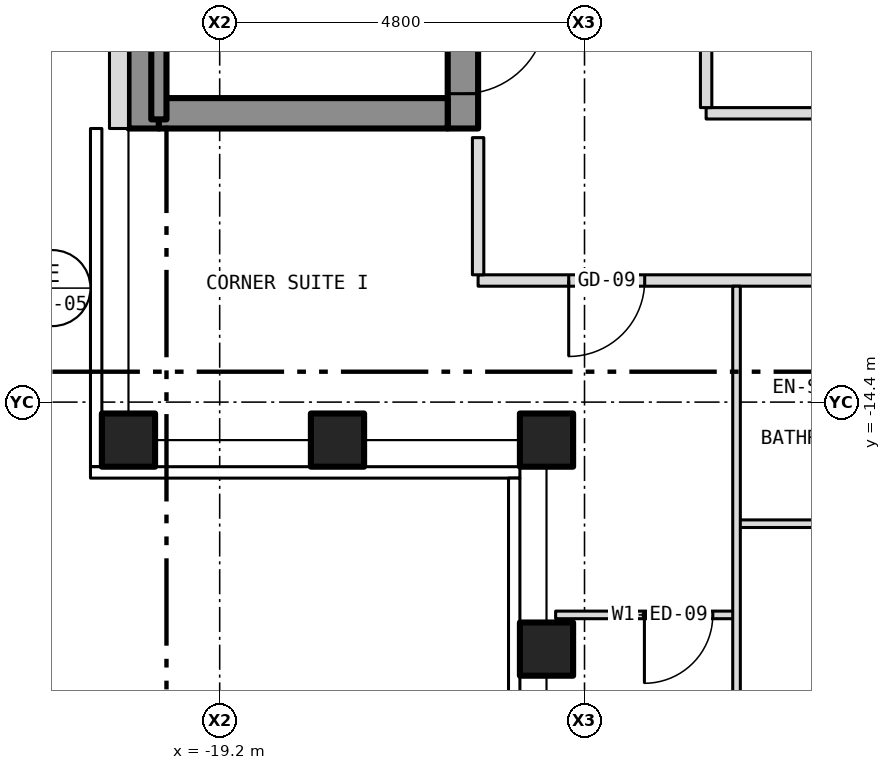
"""IFC4 building model, lengths in metres.
Left out: names, types, materials, properties, quantities, classifications, styles, units other than length and angle.
Written with IfcOpenShell. Run it as: python <this file> out.ifc"""

import sys

from ifc_helpers import new_model, si_unit, direction, frame, frame_2d, origin, origin_2d, place, context, subcontext, project, spatial, rectangle, hollow_rectangle, extrude, element, fill, save


model = new_model("IFC4")
c1 = context("Model", 3, precision=1e-05, world=origin(), true_north=direction((0.0, 1.0)))
c2 = subcontext(c1, "Body", "Model", "MODEL_VIEW")
j1 = project(units=[si_unit("LENGTHUNIT", "METRE"), si_unit("PLANEANGLEUNIT", "RADIAN")], contexts=[c1])
p1 = place(None, origin())
s1 = spatial("IfcSite", under=j1, at=p1, CompositionType="ELEMENT")
p2 = place(p1, origin())
s2 = spatial("IfcBuilding", under=s1, at=p2, CompositionType="ELEMENT")
p3 = place(p2, frame((0.0, 0.0, 201.5)))
s3 = spatial("IfcBuildingStorey", under=s2, at=p3, CompositionType="ELEMENT", Elevation=201.5)
for number, where, z_axis, x_axis in (
    (1, (-20.4, -14.9, -0.15), (0.0, 0.0, 1.0), (1.0, 0.0, 0.0)),
    (2, (-14.9, -14.9, -0.15), (0.0, 0.0, 1.0), (1.0, 0.0, 0.0)),
    (3, (-14.9, -17.65, -0.15), (0.0, 0.0, 1.0), (1.0, 0.0, 0.0)),
    (4, (-17.65, -14.9, -0.15), (0.0, 0.0, 1.0), (1.0, 0.0, 0.0)),
):
    element("IfcColumn", number, at=place(p3, frame(where, z_axis=z_axis, x_axis=x_axis)), inside=s3, PredefinedType="COLUMN", context=c2, shape_type="SweptSolid", body=[
        extrude(hollow_rectangle(XDim=0.7, YDim=0.7, WallThickness=0.04, at=origin_2d()), origin(), (0.0, 0.0, 1.0), 3.5),
    ])
p4 = place(p3, frame((-16.0, -10.8, 0.0), z_axis=(0.0, 0.0, 1.0), x_axis=(0.0, 1.0, 0.0)))
e5 = element("IfcWall", 5, at=p4, inside=s3, PredefinedType="SHEAR", context=c2, shape_type="SweptSolid", body=[
    extrude(rectangle(XDim=21.6, YDim=0.4, at=frame_2d((10.8, 0.0))), origin(), (0.0, 0.0, 1.0), 3.25),
])
p5 = place(p4, frame((9.4, 0.0, 0.0)))
e6 = element("IfcOpeningElement", 6, at=p5, cuts=e5, PredefinedType="OPENING", context=c2, shape_type="SweptSolid", body=[
    extrude(rectangle(XDim=1.1, YDim=2.1, at=frame_2d((0.55, 1.05))), frame((0.0, 0.212, 0.0), z_axis=(0.0, -1.0, 0.0), x_axis=(1.0, 0.0, 0.0)), (0.0, 0.0, 1.0), 0.424),
])
p6 = place(p4, frame((11.5, 0.0, 0.0)))
e7 = element("IfcOpeningElement", 7, at=p6, cuts=e5, PredefinedType="OPENING", context=c2, shape_type="SweptSolid", body=[
    extrude(rectangle(XDim=1.1, YDim=2.1, at=frame_2d((0.55, 1.05))), frame((0.0, 0.212, 0.0), z_axis=(0.0, -1.0, 0.0), x_axis=(1.0, 0.0, 0.0)), (0.0, 0.0, 1.0), 0.424),
])
p7 = place(p4, frame((13.6, 0.0, 0.0)))
e8 = element("IfcOpeningElement", 8, at=p7, cuts=e5, PredefinedType="OPENING", context=c2, shape_type="SweptSolid", body=[
    extrude(rectangle(XDim=1.1, YDim=2.1, at=frame_2d((0.55, 1.05))), frame((0.0, 0.212, 0.0), z_axis=(0.0, -1.0, 0.0), x_axis=(1.0, 0.0, 0.0)), (0.0, 0.0, 1.0), 0.424),
])
p8 = place(p4, frame((15.7, 0.0, 0.0)))
e9 = element("IfcOpeningElement", 9, at=p8, cuts=e5, PredefinedType="OPENING", context=c2, shape_type="SweptSolid", body=[
    extrude(rectangle(XDim=1.1, YDim=2.1, at=frame_2d((0.55, 1.05))), frame((0.0, 0.212, 0.0), z_axis=(0.0, -1.0, 0.0), x_axis=(1.0, 0.0, 0.0)), (0.0, 0.0, 1.0), 0.424),
])
p9 = place(p4, frame((17.8, 0.0, 0.0)))
e10 = element("IfcOpeningElement", 10, at=p9, cuts=e5, PredefinedType="OPENING", context=c2, shape_type="SweptSolid", body=[
    extrude(rectangle(XDim=1.1, YDim=2.1, at=frame_2d((0.55, 1.05))), frame((0.0, 0.212, 0.0), z_axis=(0.0, -1.0, 0.0), x_axis=(1.0, 0.0, 0.0)), (0.0, 0.0, 1.0), 0.424),
])
p10 = place(p4, frame((0.458, 0.0, 0.0)))
e11 = element("IfcOpeningElement", 11, at=p10, cuts=e5, PredefinedType="OPENING", context=c2, shape_type="SweptSolid", body=[
    extrude(rectangle(XDim=1.1, YDim=2.1, at=frame_2d((0.55, 1.05))), frame((0.0, 0.212, 0.0), z_axis=(0.0, -1.0, 0.0), x_axis=(1.0, 0.0, 0.0)), (0.0, 0.0, 1.0), 0.424),
])
p11 = place(p4, frame((7.5, 0.0, 0.0)))
e12 = element("IfcOpeningElement", 12, at=p11, cuts=e5, PredefinedType="OPENING", context=c2, shape_type="SweptSolid", body=[
    extrude(rectangle(XDim=1.1, YDim=2.1, at=frame_2d((0.55, 1.05))), frame((0.0, 0.212, 0.0), z_axis=(0.0, -1.0, 0.0), x_axis=(1.0, 0.0, 0.0)), (0.0, 0.0, 1.0), 0.424),
])
p12 = place(p4, frame((20.0, 0.0, 0.0)))
e13 = element("IfcOpeningElement", 13, at=p12, cuts=e5, PredefinedType="OPENING", context=c2, shape_type="SweptSolid", body=[
    extrude(rectangle(XDim=0.9, YDim=2.1, at=frame_2d((0.45, 1.05))), frame((0.0, 0.212, 0.0), z_axis=(0.0, -1.0, 0.0), x_axis=(1.0, 0.0, 0.0)), (0.0, 0.0, 1.0), 0.424),
])
p13 = place(p3, frame((-20.2, -10.8, 0.0), z_axis=(0.0, 0.0, 1.0), x_axis=(0.0, 1.0, 0.0)))
e14 = element("IfcWall", 14, at=p13, inside=s3, PredefinedType="SHEAR", context=c2, shape_type="SweptSolid", body=[
    extrude(rectangle(XDim=21.6, YDim=0.4, at=frame_2d((10.8, 0.0))), origin(), (0.0, 0.0, 1.0), 3.25),
])
p14 = place(p3, frame((-20.0, -10.6, 0.0), z_axis=(0.0, 0.0, 1.0), x_axis=(1.0, 0.0, 0.0)))
e15 = element("IfcWall", 15, at=p14, inside=s3, PredefinedType="SHEAR", context=c2, shape_type="SweptSolid", body=[
    extrude(rectangle(XDim=3.8, YDim=0.4, at=frame_2d((1.9, 0.0))), origin(), (0.0, 0.0, 1.0), 3.25),
])
p15 = place(p3, frame((-20.525, 10.8, 0.0), z_axis=(0.0, 0.0, 1.0), x_axis=(0.0, -1.0, 0.0)))
e16 = element("IfcWall", 16, at=p15, inside=s3, PredefinedType="SOLIDWALL", context=c2, shape_type="SweptSolid", body=[
    extrude(rectangle(XDim=21.6, YDim=0.25, at=frame_2d((10.8, 0.0))), origin(), (0.0, 0.0, 1.0), 3.5),
])
p16 = place(p15, frame((18.05, 0.0, 1.0)))
e17 = element("IfcOpeningElement", 17, at=p16, cuts=e16, PredefinedType="OPENING", context=c2, shape_type="SweptSolid", body=[
    extrude(rectangle(XDim=0.6, YDim=1.5, at=frame_2d((0.3, 0.75))), frame((0.0, 0.137, 0.0), z_axis=(0.0, -1.0, 0.0), x_axis=(1.0, 0.0, 0.0)), (0.0, 0.0, 1.0), 0.274),
])
p17 = place(p3, frame((-14.78, -17.2, 0.0), z_axis=(0.0, 0.0, 1.0), x_axis=(1.0, 0.0, 0.0)))
e18 = element("IfcWall", 18, at=p17, inside=s3, PredefinedType="PARTITIONING", context=c2, shape_type="SweptSolid", body=[
    extrude(rectangle(XDim=2.38, YDim=0.1, at=frame_2d((1.19, 0.0))), origin(), (0.0, 0.0, 1.0), 3.35),
])
p18 = place(p17, frame((1.168, 0.0, 0.0)))
e19 = element("IfcOpeningElement", 19, at=p18, cuts=e18, PredefinedType="OPENING", context=c2, shape_type="SweptSolid", body=[
    extrude(rectangle(XDim=0.9, YDim=2.1, at=frame_2d((0.45, 1.05))), frame((0.0, 0.062, 0.0), z_axis=(0.0, -1.0, 0.0), x_axis=(1.0, 0.0, 0.0)), (0.0, 0.0, 1.0), 0.124),
])
p19 = place(p3, frame((-12.4, -16.0, 0.0), z_axis=(0.0, 0.0, 1.0), x_axis=(1.0, 0.0, 0.0)))
e20 = element("IfcWall", 20, at=p19, inside=s3, PredefinedType="PARTITIONING", context=c2, shape_type="SweptSolid", body=[
    extrude(rectangle(XDim=2.2, YDim=0.1, at=frame_2d((1.1, 0.0))), origin(), (0.0, 0.0, 1.0), 3.35),
])
p20 = place(p3, frame((-15.8, -12.8, 0.0), z_axis=(0.0, 0.0, 1.0), x_axis=(1.0, 0.0, 0.0)))
e21 = element("IfcWall", 21, at=p20, inside=s3, PredefinedType="PARTITIONING", context=c2, shape_type="SweptSolid", body=[
    extrude(rectangle(XDim=31.6, YDim=0.15, at=frame_2d((15.8, 0.0))), origin(), (0.0, 0.0, 1.0), 3.35),
])
p21 = place(p20, frame((6.466, 0.0, 0.0)))
e22 = element("IfcOpeningElement", 22, at=p21, cuts=e21, PredefinedType="OPENING", context=c2, shape_type="SweptSolid", body=[
    extrude(rectangle(XDim=1.0, YDim=2.1, at=frame_2d((0.5, 1.05))), frame((0.0, 0.087, 0.0), z_axis=(0.0, -1.0, 0.0), x_axis=(1.0, 0.0, 0.0)), (0.0, 0.0, 1.0), 0.174),
])
p22 = place(p20, frame((11.434, 0.0, 0.0)))
e23 = element("IfcOpeningElement", 23, at=p22, cuts=e21, PredefinedType="OPENING", context=c2, shape_type="SweptSolid", body=[
    extrude(rectangle(XDim=1.0, YDim=2.1, at=frame_2d((0.5, 1.05))), frame((0.0, 0.087, 0.0), z_axis=(0.0, -1.0, 0.0), x_axis=(1.0, 0.0, 0.0)), (0.0, 0.0, 1.0), 0.174),
])
p23 = place(p20, frame((15.442, 0.0, 0.0)))
e24 = element("IfcOpeningElement", 24, at=p23, cuts=e21, PredefinedType="OPENING", context=c2, shape_type="SweptSolid", body=[
    extrude(rectangle(XDim=1.0, YDim=2.1, at=frame_2d((0.5, 1.05))), frame((0.0, 0.087, 0.0), z_axis=(0.0, -1.0, 0.0), x_axis=(1.0, 0.0, 0.0)), (0.0, 0.0, 1.0), 0.174),
])
p24 = place(p20, frame((25.092, 0.0, 0.0)))
e25 = element("IfcOpeningElement", 25, at=p24, cuts=e21, PredefinedType="OPENING", context=c2, shape_type="SweptSolid", body=[
    extrude(rectangle(XDim=1.0, YDim=2.1, at=frame_2d((0.5, 1.05))), frame((0.0, 0.087, 0.0), z_axis=(0.0, -1.0, 0.0), x_axis=(1.0, 0.0, 0.0)), (0.0, 0.0, 1.0), 0.174),
])
p25 = place(p20, frame((1.192, 0.0, 0.0)))
e26 = element("IfcOpeningElement", 26, at=p25, cuts=e21, PredefinedType="OPENING", context=c2, shape_type="SweptSolid", body=[
    extrude(rectangle(XDim=1.0, YDim=2.1, at=frame_2d((0.5, 1.05))), frame((0.0, 0.087, 0.0), z_axis=(0.0, -1.0, 0.0), x_axis=(1.0, 0.0, 0.0)), (0.0, 0.0, 1.0), 0.174),
])
p26 = place(p20, frame((29.409, 0.0, 0.0)))
e27 = element("IfcOpeningElement", 27, at=p26, cuts=e21, PredefinedType="OPENING", context=c2, shape_type="SweptSolid", body=[
    extrude(rectangle(XDim=1.0, YDim=2.1, at=frame_2d((0.5, 1.05))), frame((0.0, 0.087, 0.0), z_axis=(0.0, -1.0, 0.0), x_axis=(1.0, 0.0, 0.0)), (0.0, 0.0, 1.0), 0.174),
])
p27 = place(p3, frame((-12.8, -10.6, 0.0), z_axis=(0.0, 0.0, 1.0), x_axis=(1.0, 0.0, 0.0)))
e28 = element("IfcWall", 28, at=p27, inside=s3, PredefinedType="PARTITIONING", context=c2, shape_type="SweptSolid", body=[
    extrude(rectangle(XDim=16.9, YDim=0.15, at=frame_2d((8.45, 0.0))), origin(), (0.0, 0.0, 1.0), 3.35),
])
p28 = place(p27, frame((5.95, 0.0, 0.0)))
e29 = element("IfcOpeningElement", 29, at=p28, cuts=e28, PredefinedType="OPENING", context=c2, shape_type="SweptSolid", body=[
    extrude(rectangle(XDim=0.9, YDim=2.1, at=frame_2d((0.45, 1.05))), frame((0.0, 0.087, 0.0), z_axis=(0.0, -1.0, 0.0), x_axis=(1.0, 0.0, 0.0)), (0.0, 0.0, 1.0), 0.174),
])
p29 = place(p3, frame((-20.0, -10.68, 0.0), z_axis=(0.0, 0.0, 1.0), x_axis=(0.0, 1.0, 0.0)))
e30 = element("IfcWall", 30, at=p29, inside=s3, PredefinedType="SHEAR", context=c2, shape_type="SweptSolid", body=[
    extrude(rectangle(XDim=6.98, YDim=0.2, at=frame_2d((3.49, 0.0))), origin(), (0.0, 0.0, 1.0), 3.25),
])
p30 = place(p3, frame((-15.8, -12.725, 0.0), z_axis=(0.0, 0.0, 1.0), x_axis=(0.0, 1.0, 0.0)))
e31 = element("IfcWall", 31, at=p30, inside=s3, PredefinedType="PARTITIONING", context=c2, shape_type="SweptSolid", body=[
    extrude(rectangle(XDim=1.805, YDim=0.15, at=frame_2d((0.903, 0.0))), origin(), (0.0, 0.0, 1.0), 3.35),
])
p31 = place(p3, frame((-12.8, -10.525, 0.0), z_axis=(0.0, 0.0, 1.0), x_axis=(0.0, 1.0, 0.0)))
e32 = element("IfcWall", 32, at=p31, inside=s3, PredefinedType="PARTITIONING", context=c2, shape_type="SweptSolid", body=[
    extrude(rectangle(XDim=8.525, YDim=0.15, at=frame_2d((4.262, 0.0))), origin(), (0.0, 0.0, 1.0), 3.35),
])
p32 = place(p3, frame((-12.4, -20.78, 0.0), z_axis=(0.0, 0.0, 1.0), x_axis=(0.0, 1.0, 0.0)))
e33 = element("IfcWall", 33, at=p32, inside=s3, PredefinedType="PARTITIONING", context=c2, shape_type="SweptSolid", body=[
    extrude(rectangle(XDim=7.905, YDim=0.1, at=frame_2d((3.953, 0.0))), origin(), (0.0, 0.0, 1.0), 3.35),
])
p33 = place(p10, origin())
e34 = element("IfcDoor", 34, at=p33, inside=s3, OperationType="SINGLE_SWING_RIGHT", PredefinedType="DOOR", context=c2, shape_type="SweptSolid", body=[
    extrude(rectangle(XDim=1.1, YDim=2.1, at=frame_2d((0.55, 1.05))), frame((0.0, 0.025, 0.0), z_axis=(0.0, -1.0, 0.0), x_axis=(1.0, 0.0, 0.0)), (0.0, 0.0, 1.0), 0.05),
])
fill(e11, e34)
p34 = place(p18, origin())
e35 = element("IfcDoor", 35, at=p34, inside=s3, OperationType="SINGLE_SWING_LEFT", PredefinedType="DOOR", context=c2, shape_type="SweptSolid", body=[
    extrude(rectangle(XDim=0.9, YDim=2.1, at=frame_2d((0.45, 1.05))), frame((0.0, 0.025, 0.0), z_axis=(0.0, -1.0, 0.0), x_axis=(1.0, 0.0, 0.0)), (0.0, 0.0, 1.0), 0.05),
])
fill(e19, e35)
p35 = place(p25, origin())
e36 = element("IfcDoor", 36, at=p35, inside=s3, OperationType="SINGLE_SWING_LEFT", PredefinedType="DOOR", context=c2, shape_type="SweptSolid", body=[
    extrude(rectangle(XDim=1.0, YDim=2.1, at=frame_2d((0.5, 1.05))), frame((0.0, 0.025, 0.0), z_axis=(0.0, -1.0, 0.0), x_axis=(1.0, 0.0, 0.0)), (0.0, 0.0, 1.0), 0.05),
])
fill(e26, e36)
save(model, sys.argv[1])
